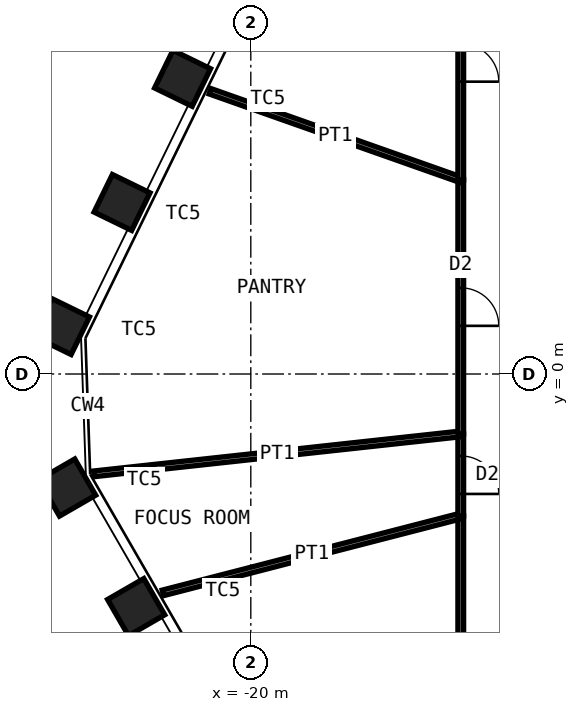
"""IFC4 building model, lengths in metres.
Left out: names, types, materials, properties, quantities, classifications, styles, units other than length and angle.
Written with IfcOpenShell. Run it as: python <this file> out.ifc"""

import sys

from ifc_helpers import new_model, si_unit, direction, frame, frame_2d, origin, origin_2d, place, context, subcontext, project, spatial, rectangle, hollow_rectangle, extrude, element, fill, save


model = new_model("IFC4")
c1 = context("Model", 3, precision=1e-05, world=origin(), true_north=direction((0.0, 1.0)))
c2 = subcontext(c1, "Body", "Model", "MODEL_VIEW")
j1 = project(units=[si_unit("LENGTHUNIT", "METRE"), si_unit("PLANEANGLEUNIT", "RADIAN")], contexts=[c1])
p1 = place(None, origin())
s1 = spatial("IfcSite", under=j1, at=p1, CompositionType="ELEMENT")
p2 = place(p1, origin())
s2 = spatial("IfcBuilding", under=s1, at=p2, CompositionType="ELEMENT")
p3 = place(p2, frame((0.0, 0.0, 197.2)))
s3 = spatial("IfcBuildingStorey", under=s2, at=p3, CompositionType="ELEMENT", Elevation=197.2)
for number, where, z_axis, x_axis in (
    (1, (-23.016, -6.134, 0.0), (0.0, 0.0, 1.0), (0.5, -0.866, 0.0)),
    (2, (-24.833, -2.988, 0.0), (0.0, 0.0, 1.0), (0.5, -0.866, 0.0)),
    (3, (-24.981, 1.248, 0.0), (0.0, 0.0, 1.0), (-0.438, -0.899, 0.0)),
    (4, (-23.388, 4.514, 0.0), (0.0, 0.0, 1.0), (-0.438, -0.899, 0.0)),
    (5, (-21.795, 7.78, 0.0), (0.0, 0.0, 1.0), (-0.438, -0.899, 0.0)),
):
    element("IfcColumn", number, at=place(p3, frame(where, z_axis=z_axis, x_axis=x_axis)), inside=s3, PredefinedType="COLUMN", context=c2, shape_type="SweptSolid", body=[
        extrude(hollow_rectangle(XDim=1.1, YDim=1.1, WallThickness=0.07, at=origin_2d()), origin(), (0.0, 0.0, 1.0), 4.2),
    ])
p4 = place(p3, frame((-14.475, -11.475, 0.0), z_axis=(0.0, 0.0, 1.0), x_axis=(0.0, 1.0, 0.0)))
e6 = element("IfcWall", 6, at=p4, inside=s3, PredefinedType="PARTITIONING", context=c2, shape_type="SweptSolid", body=[
    extrude(rectangle(XDim=7.739, YDim=0.15, at=frame_2d((3.87, 0.0))), origin(), (0.0, 0.0, 1.0), 4.03),
])
p5 = place(p3, frame((-22.313, -5.759, 0.0), z_axis=(0.0, 0.0, 1.0), x_axis=(0.968265788926, 0.249922712042, 0.0)))
e7 = element("IfcWall", 7, at=p5, inside=s3, PredefinedType="PARTITIONING", context=c2, shape_type="SweptSolid", body=[
    extrude(rectangle(XDim=8.095, YDim=0.15, at=frame_2d((4.048, 0.0))), origin(), (0.0, 0.0, 1.0), 3.43),
])
p6 = place(p3, frame((-14.475, -3.736, 0.0), z_axis=(0.0, 0.0, 1.0), x_axis=(0.0, 1.0, 0.0)))
e8 = element("IfcWall", 8, at=p6, inside=s3, PredefinedType="PARTITIONING", context=c2, shape_type="SweptSolid", body=[
    extrude(rectangle(XDim=2.16, YDim=0.15, at=frame_2d((1.08, 0.0))), origin(), (0.0, 0.0, 1.0), 4.03),
])
p7 = place(p6, frame((0.58, 0.0, 0.0)))
e9 = element("IfcOpeningElement", 9, at=p7, cuts=e8, PredefinedType="OPENING", context=c2, shape_type="SweptSolid", body=[
    extrude(rectangle(XDim=1.0, YDim=2.4, at=frame_2d((0.5, 1.2))), frame((0.0, 0.085, 0.0), z_axis=(0.0, -1.0, 0.0), x_axis=(1.0, 0.0, 0.0)), (0.0, 0.0, 1.0), 0.17),
])
p8 = place(p3, frame((-24.128, -2.627, 0.0), z_axis=(0.0, 0.0, 1.0), x_axis=(0.994126892449, 0.108220708326, 0.0)))
e10 = element("IfcWall", 10, at=p8, inside=s3, PredefinedType="PARTITIONING", context=c2, shape_type="SweptSolid", body=[
    extrude(rectangle(XDim=9.71, YDim=0.15, at=frame_2d((4.855, 0.0))), origin(), (0.0, 0.0, 1.0), 2.93),
])
p9 = place(p3, frame((-14.475, -1.576, 0.0), z_axis=(0.0, 0.0, 1.0), x_axis=(0.0, 1.0, 0.0)))
e11 = element("IfcWall", 11, at=p9, inside=s3, PredefinedType="PARTITIONING", context=c2, shape_type="SweptSolid", body=[
    extrude(rectangle(XDim=6.686, YDim=0.15, at=frame_2d((3.343, 0.0))), origin(), (0.0, 0.0, 1.0), 4.03),
])
p10 = place(p9, frame((2.843, 0.0, 0.0)))
e12 = element("IfcOpeningElement", 12, at=p10, cuts=e11, PredefinedType="OPENING", context=c2, shape_type="SweptSolid", body=[
    extrude(rectangle(XDim=1.0, YDim=2.4, at=frame_2d((0.5, 1.2))), frame((0.0, 0.085, 0.0), z_axis=(0.0, -1.0, 0.0), x_axis=(1.0, 0.0, 0.0)), (0.0, 0.0, 1.0), 0.17),
])
p11 = place(p3, frame((-21.072, 7.439, 0.0), z_axis=(0.0, 0.0, 1.0), x_axis=(0.94295553867, -0.332918686907, 0.0)))
e13 = element("IfcWall", 13, at=p11, inside=s3, PredefinedType="PARTITIONING", context=c2, shape_type="SweptSolid", body=[
    extrude(rectangle(XDim=6.996, YDim=0.15, at=frame_2d((3.498, 0.0))), origin(), (0.0, 0.0, 1.0), 3.43),
])
p12 = place(p3, frame((-14.475, 5.11, 0.0), z_axis=(0.0, 0.0, 1.0), x_axis=(0.0, 1.0, 0.0)))
e14 = element("IfcWall", 14, at=p12, inside=s3, PredefinedType="PARTITIONING", context=c2, shape_type="SweptSolid", body=[
    extrude(rectangle(XDim=6.164, YDim=0.15, at=frame_2d((3.082, 0.0))), origin(), (0.0, 0.0, 1.0), 4.03),
])
p13 = place(p12, frame((2.582, 0.0, 0.0)))
e15 = element("IfcOpeningElement", 15, at=p13, cuts=e14, PredefinedType="OPENING", context=c2, shape_type="SweptSolid", body=[
    extrude(rectangle(XDim=1.0, YDim=2.4, at=frame_2d((0.5, 1.2))), frame((0.0, 0.085, 0.0), z_axis=(0.0, -1.0, 0.0), x_axis=(1.0, 0.0, 0.0)), (0.0, 0.0, 1.0), 0.17),
])
p14 = place(p7, origin())
e16 = element("IfcDoor", 16, at=p14, inside=s3, OperationType="SINGLE_SWING_LEFT", PredefinedType="DOOR", context=c2, shape_type="SweptSolid", body=[
    extrude(rectangle(XDim=1.0, YDim=2.4, at=frame_2d((0.5, 1.2))), frame((0.0, 0.025, 0.0), z_axis=(0.0, -1.0, 0.0), x_axis=(1.0, 0.0, 0.0)), (0.0, 0.0, 1.0), 0.05),
])
fill(e9, e16)
p15 = place(p10, origin())
e17 = element("IfcDoor", 17, at=p15, inside=s3, OperationType="SINGLE_SWING_LEFT", PredefinedType="DOOR", context=c2, shape_type="SweptSolid", body=[
    extrude(rectangle(XDim=1.0, YDim=2.4, at=frame_2d((0.5, 1.2))), frame((0.0, 0.025, 0.0), z_axis=(0.0, -1.0, 0.0), x_axis=(1.0, 0.0, 0.0)), (0.0, 0.0, 1.0), 0.05),
])
fill(e12, e17)
p16 = place(p13, origin())
e18 = element("IfcDoor", 18, at=p16, inside=s3, OperationType="SINGLE_SWING_LEFT", PredefinedType="DOOR", context=c2, shape_type="SweptSolid", body=[
    extrude(rectangle(XDim=1.0, YDim=2.4, at=frame_2d((0.5, 1.2))), frame((0.0, 0.025, 0.0), z_axis=(0.0, -1.0, 0.0), x_axis=(1.0, 0.0, 0.0)), (0.0, 0.0, 1.0), 0.05),
])
fill(e15, e18)
save(model, sys.argv[1])
